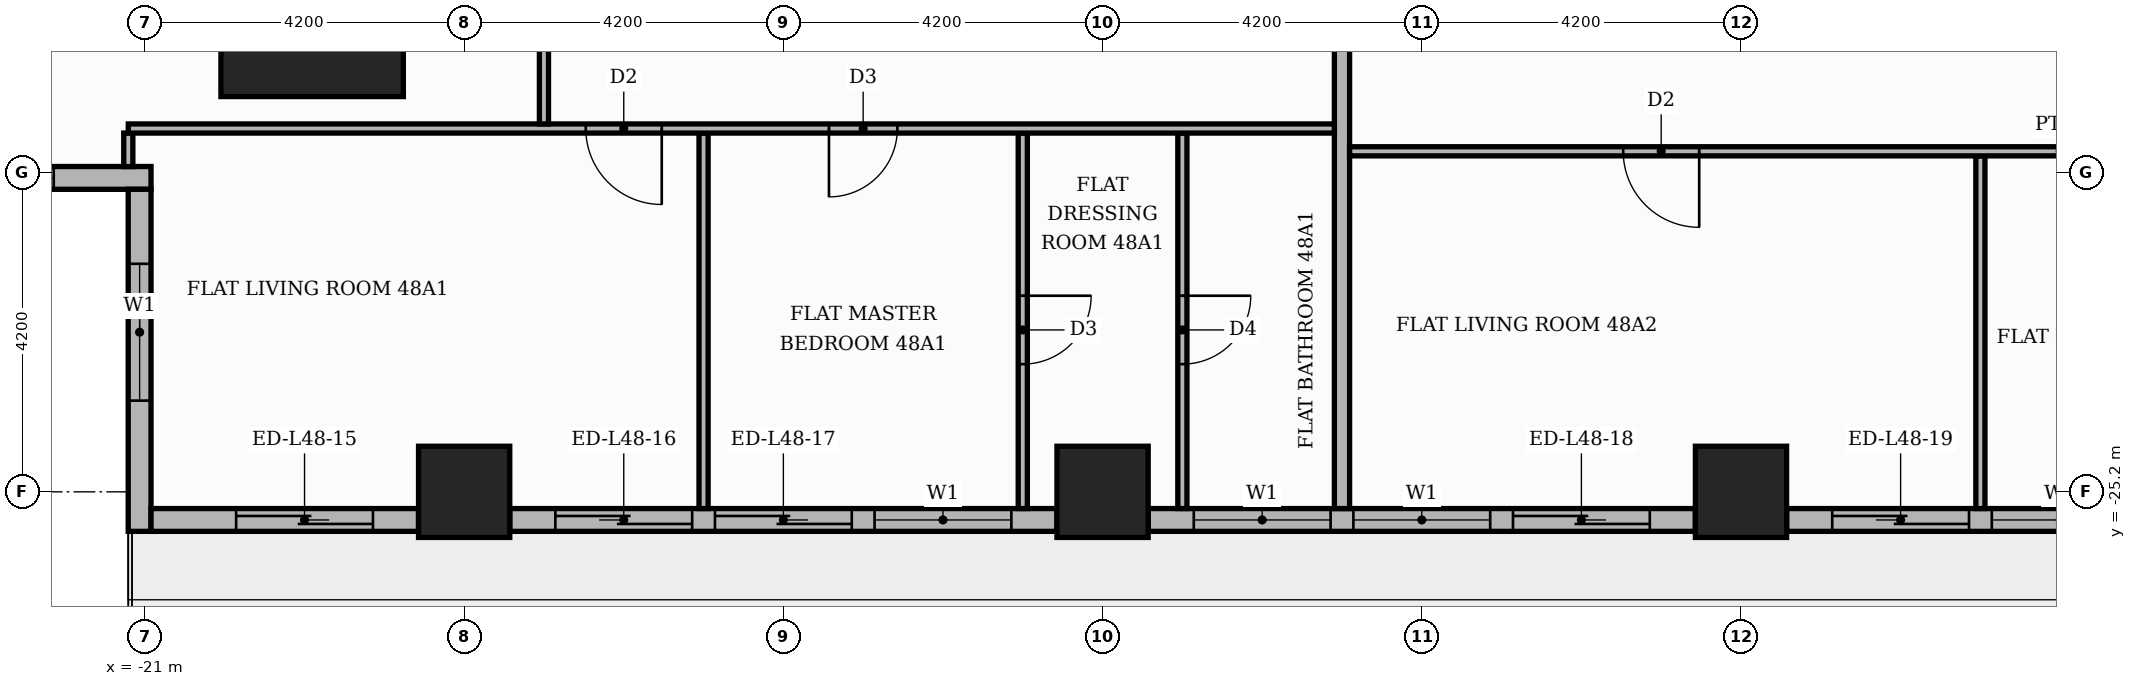
"""IFC4 building model, lengths in metres.
Left out: names, types, materials, properties, quantities, classifications, styles, units other than length and angle.
Written with IfcOpenShell. Run it as: python <this file> out.ifc"""

import sys

from ifc_helpers import new_model, si_unit, direction, frame, frame_2d, origin, origin_2d, place, context, subcontext, project, spatial, rectangle, extrude, element, fill, save


model = new_model("IFC4")
c1 = context("Model", 3, precision=1e-05, world=origin(), true_north=direction((0.0, 1.0)))
c2 = subcontext(c1, "Body", "Model", "MODEL_VIEW")
j1 = project(units=[si_unit("LENGTHUNIT", "METRE"), si_unit("PLANEANGLEUNIT", "RADIAN")], contexts=[c1])
p1 = place(None, origin())
s1 = spatial("IfcSite", under=j1, at=p1, CompositionType="ELEMENT")
p2 = place(p1, origin())
s2 = spatial("IfcBuilding", under=s1, at=p2, CompositionType="ELEMENT")
p3 = place(p2, frame((0.0, 0.0, 204.0)))
s3 = spatial("IfcBuildingStorey", under=s2, at=p3, CompositionType="ELEMENT", Elevation=204.0)
p4 = place(p3, frame((-18.8, -18.8, 0.0), z_axis=(0.0, 0.0, 1.0), x_axis=(1.0, 0.0, 0.0)))
e1 = element("IfcColumn", 1, at=p4, inside=s3, PredefinedType="COLUMN", context=c2, shape_type="SweptSolid", body=[
    extrude(rectangle(XDim=2.4, YDim=2.4, at=origin_2d()), origin(), (0.0, 0.0, 1.0), 3.9),
])
for number, where, z_axis, x_axis in (
    (2, (0.0, -25.2, 0.0), (0.0, 0.0, 1.0), (1.0, 0.0, 0.0)),
    (3, (-8.4, -25.2, 0.0), (0.0, 0.0, 1.0), (1.0, 0.0, 0.0)),
    (4, (-16.8, -25.2, 0.0), (0.0, 0.0, 1.0), (1.0, 0.0, 0.0)),
):
    element("IfcColumn", number, at=place(p3, frame(where, z_axis=z_axis, x_axis=x_axis)), inside=s3, PredefinedType="COLUMN", context=c2, shape_type="SweptSolid", body=[
        extrude(rectangle(XDim=1.2, YDim=1.2, at=origin_2d()), origin(), (0.0, 0.0, 1.0), 3.9),
    ])
p5 = place(p3, frame((-25.42, -21.07, 0.0), z_axis=(0.0, 0.0, 1.0), x_axis=(1.0, 0.0, 0.0)))
e5 = element("IfcWall", 5, at=p5, inside=s3, PredefinedType="STANDARD", context=c2, shape_type="SweptSolid", body=[
    extrude(rectangle(XDim=4.5, YDim=0.3, at=frame_2d((2.25, 0.0))), origin(), (0.0, 0.0, 1.0), 3.48),
])
p6 = place(p5, frame((1.42, 0.0, 0.9)))
e6 = element("IfcOpeningElement", 6, at=p6, cuts=e5, PredefinedType="OPENING", context=c2, shape_type="SweptSolid", body=[
    extrude(rectangle(XDim=1.8, YDim=2.1, at=frame_2d((0.9, 1.05))), frame((0.0, 0.16, 0.0), z_axis=(0.0, -1.0, 0.0), x_axis=(1.0, 0.0, 0.0)), (0.0, 0.0, 1.0), 0.32),
])
p7 = place(p3, frame((-21.07, -21.22, 0.0), z_axis=(0.0, 0.0, 1.0), x_axis=(0.0, -1.0, 0.0)))
e7 = element("IfcWall", 7, at=p7, inside=s3, PredefinedType="STANDARD", context=c2, shape_type="SweptSolid", body=[
    extrude(rectangle(XDim=4.5, YDim=0.3, at=frame_2d((2.25, 0.0))), origin(), (0.0, 0.0, 1.0), 3.48),
])
p8 = place(p7, frame((0.98, 0.0, 0.9)))
e8 = element("IfcOpeningElement", 8, at=p8, cuts=e7, PredefinedType="OPENING", context=c2, shape_type="SweptSolid", body=[
    extrude(rectangle(XDim=1.8, YDim=2.1, at=frame_2d((0.9, 1.05))), frame((0.0, 0.16, 0.0), z_axis=(0.0, -1.0, 0.0), x_axis=(1.0, 0.0, 0.0)), (0.0, 0.0, 1.0), 0.32),
])
p9 = place(p3, frame((-20.92, -25.57, 0.0), z_axis=(0.0, 0.0, 1.0), x_axis=(1.0, 0.0, 0.0)))
e9 = element("IfcWall", 9, at=p9, inside=s3, PredefinedType="STANDARD", context=c2, shape_type="SweptSolid", body=[
    extrude(rectangle(XDim=3.52, YDim=0.3, at=frame_2d((1.76, 0.0))), origin(), (0.0, 0.0, 1.0), 3.48),
])
p10 = place(p9, frame((1.12, 0.0, 0.0)))
e10 = element("IfcOpeningElement", 10, at=p10, cuts=e9, PredefinedType="OPENING", context=c2, shape_type="SweptSolid", body=[
    extrude(rectangle(XDim=1.8, YDim=2.4, at=frame_2d((0.9, 1.2))), frame((0.0, 0.16, 0.0), z_axis=(0.0, -1.0, 0.0), x_axis=(1.0, 0.0, 0.0)), (0.0, 0.0, 1.0), 0.32),
])
p11 = place(p3, frame((-16.2, -25.57, 0.0), z_axis=(0.0, 0.0, 1.0), x_axis=(1.0, 0.0, 0.0)))
e11 = element("IfcWall", 11, at=p11, inside=s3, PredefinedType="STANDARD", context=c2, shape_type="SweptSolid", body=[
    extrude(rectangle(XDim=7.2, YDim=0.3, at=frame_2d((3.6, 0.0))), origin(), (0.0, 0.0, 1.0), 3.48),
])
p12 = place(p11, frame((0.6, 0.0, 0.0)))
e12 = element("IfcOpeningElement", 12, at=p12, cuts=e11, PredefinedType="OPENING", context=c2, shape_type="SweptSolid", body=[
    extrude(rectangle(XDim=1.8, YDim=2.4, at=frame_2d((0.9, 1.2))), frame((0.0, 0.16, 0.0), z_axis=(0.0, -1.0, 0.0), x_axis=(1.0, 0.0, 0.0)), (0.0, 0.0, 1.0), 0.32),
])
p13 = place(p11, frame((2.7, 0.0, 0.0)))
e13 = element("IfcOpeningElement", 13, at=p13, cuts=e11, PredefinedType="OPENING", context=c2, shape_type="SweptSolid", body=[
    extrude(rectangle(XDim=1.8, YDim=2.4, at=frame_2d((0.9, 1.2))), frame((0.0, 0.16, 0.0), z_axis=(0.0, -1.0, 0.0), x_axis=(1.0, 0.0, 0.0)), (0.0, 0.0, 1.0), 0.32),
])
p14 = place(p11, frame((4.8, 0.0, 0.9)))
e14 = element("IfcOpeningElement", 14, at=p14, cuts=e11, PredefinedType="OPENING", context=c2, shape_type="SweptSolid", body=[
    extrude(rectangle(XDim=1.8, YDim=2.1, at=frame_2d((0.9, 1.05))), frame((0.0, 0.16, 0.0), z_axis=(0.0, -1.0, 0.0), x_axis=(1.0, 0.0, 0.0)), (0.0, 0.0, 1.0), 0.32),
])
p15 = place(p3, frame((-7.8, -25.57, 0.0), z_axis=(0.0, 0.0, 1.0), x_axis=(1.0, 0.0, 0.0)))
e15 = element("IfcWall", 15, at=p15, inside=s3, PredefinedType="STANDARD", context=c2, shape_type="SweptSolid", body=[
    extrude(rectangle(XDim=7.2, YDim=0.3, at=frame_2d((3.6, 0.0))), origin(), (0.0, 0.0, 1.0), 3.48),
])
p16 = place(p15, frame((0.6, 0.0, 0.9)))
e16 = element("IfcOpeningElement", 16, at=p16, cuts=e15, PredefinedType="OPENING", context=c2, shape_type="SweptSolid", body=[
    extrude(rectangle(XDim=1.8, YDim=2.1, at=frame_2d((0.9, 1.05))), frame((0.0, 0.16, 0.0), z_axis=(0.0, -1.0, 0.0), x_axis=(1.0, 0.0, 0.0)), (0.0, 0.0, 1.0), 0.32),
])
p17 = place(p15, frame((2.7, 0.0, 0.9)))
e17 = element("IfcOpeningElement", 17, at=p17, cuts=e15, PredefinedType="OPENING", context=c2, shape_type="SweptSolid", body=[
    extrude(rectangle(XDim=1.8, YDim=2.1, at=frame_2d((0.9, 1.05))), frame((0.0, 0.16, 0.0), z_axis=(0.0, -1.0, 0.0), x_axis=(1.0, 0.0, 0.0)), (0.0, 0.0, 1.0), 0.32),
])
p18 = place(p15, frame((4.8, 0.0, 0.0)))
e18 = element("IfcOpeningElement", 18, at=p18, cuts=e15, PredefinedType="OPENING", context=c2, shape_type="SweptSolid", body=[
    extrude(rectangle(XDim=1.8, YDim=2.4, at=frame_2d((0.9, 1.2))), frame((0.0, 0.16, 0.0), z_axis=(0.0, -1.0, 0.0), x_axis=(1.0, 0.0, 0.0)), (0.0, 0.0, 1.0), 0.32),
])
p19 = place(p3, frame((0.6, -25.57, 0.0), z_axis=(0.0, 0.0, 1.0), x_axis=(1.0, 0.0, 0.0)))
e19 = element("IfcWall", 19, at=p19, inside=s3, PredefinedType="STANDARD", context=c2, shape_type="SweptSolid", body=[
    extrude(rectangle(XDim=7.2, YDim=0.3, at=frame_2d((3.6, 0.0))), origin(), (0.0, 0.0, 1.0), 3.48),
])
p20 = place(p19, frame((0.6, 0.0, 0.0)))
e20 = element("IfcOpeningElement", 20, at=p20, cuts=e19, PredefinedType="OPENING", context=c2, shape_type="SweptSolid", body=[
    extrude(rectangle(XDim=1.8, YDim=2.4, at=frame_2d((0.9, 1.2))), frame((0.0, 0.16, 0.0), z_axis=(0.0, -1.0, 0.0), x_axis=(1.0, 0.0, 0.0)), (0.0, 0.0, 1.0), 0.32),
])
p21 = place(p19, frame((2.7, 0.0, 0.9)))
e21 = element("IfcOpeningElement", 21, at=p21, cuts=e19, PredefinedType="OPENING", context=c2, shape_type="SweptSolid", body=[
    extrude(rectangle(XDim=1.8, YDim=2.1, at=frame_2d((0.9, 1.05))), frame((0.0, 0.16, 0.0), z_axis=(0.0, -1.0, 0.0), x_axis=(1.0, 0.0, 0.0)), (0.0, 0.0, 1.0), 0.32),
])
p22 = place(p19, frame((4.8, 0.0, 0.0)))
e22 = element("IfcOpeningElement", 22, at=p22, cuts=e19, PredefinedType="OPENING", context=c2, shape_type="SweptSolid", body=[
    extrude(rectangle(XDim=1.8, YDim=2.4, at=frame_2d((0.9, 1.2))), frame((0.0, 0.16, 0.0), z_axis=(0.0, -1.0, 0.0), x_axis=(1.0, 0.0, 0.0)), (0.0, 0.0, 1.0), 0.32),
])
p23 = place(p3, frame((-13.65, -25.42, 0.0), z_axis=(0.0, 0.0, 1.0), x_axis=(0.0, 1.0, 0.0)))
e23 = element("IfcWall", 23, at=p23, inside=s3, PredefinedType="PARTITIONING", context=c2, shape_type="SweptSolid", body=[
    extrude(rectangle(XDim=4.94, YDim=0.12, at=frame_2d((2.47, 0.0))), origin(), (0.0, 0.0, 1.0), 3.48),
])
p24 = place(p3, frame((-9.45, -25.42, 0.0), z_axis=(0.0, 0.0, 1.0), x_axis=(0.0, 1.0, 0.0)))
e24 = element("IfcWall", 24, at=p24, inside=s3, PredefinedType="PARTITIONING", context=c2, shape_type="SweptSolid", body=[
    extrude(rectangle(XDim=4.94, YDim=0.12, at=frame_2d((2.47, 0.0))), origin(), (0.0, 0.0, 1.0), 3.48),
])
p25 = place(p24, frame((1.9, 0.0, 0.0)))
e25 = element("IfcOpeningElement", 25, at=p25, cuts=e24, PredefinedType="OPENING", context=c2, shape_type="SweptSolid", body=[
    extrude(rectangle(XDim=0.9, YDim=2.1, at=frame_2d((0.45, 1.05))), frame((0.0, 0.07, 0.0), z_axis=(0.0, -1.0, 0.0), x_axis=(1.0, 0.0, 0.0)), (0.0, 0.0, 1.0), 0.14),
])
p26 = place(p3, frame((-7.35, -25.42, 0.0), z_axis=(0.0, 0.0, 1.0), x_axis=(0.0, 1.0, 0.0)))
e26 = element("IfcWall", 26, at=p26, inside=s3, PredefinedType="PARTITIONING", context=c2, shape_type="SweptSolid", body=[
    extrude(rectangle(XDim=4.94, YDim=0.12, at=frame_2d((2.47, 0.0))), origin(), (0.0, 0.0, 1.0), 3.48),
])
p27 = place(p26, frame((1.9, 0.0, 0.0)))
e27 = element("IfcOpeningElement", 27, at=p27, cuts=e26, PredefinedType="OPENING", context=c2, shape_type="SweptSolid", body=[
    extrude(rectangle(XDim=0.9, YDim=2.1, at=frame_2d((0.45, 1.05))), frame((0.0, 0.07, 0.0), z_axis=(0.0, -1.0, 0.0), x_axis=(1.0, 0.0, 0.0)), (0.0, 0.0, 1.0), 0.14),
])
p28 = place(p3, frame((-5.25, -25.42, 0.0), z_axis=(0.0, 0.0, 1.0), x_axis=(0.0, 1.0, 0.0)))
e28 = element("IfcWall", 28, at=p28, inside=s3, PredefinedType="PARTITIONING", context=c2, shape_type="SweptSolid", body=[
    extrude(rectangle(XDim=11.67, YDim=0.2, at=frame_2d((5.835, 0.0))), origin(), (0.0, 0.0, 1.0), 3.48),
])
p29 = place(p3, frame((3.15, -25.42, 0.0), z_axis=(0.0, 0.0, 1.0), x_axis=(0.0, 1.0, 0.0)))
e29 = element("IfcWall", 29, at=p29, inside=s3, PredefinedType="PARTITIONING", context=c2, shape_type="SweptSolid", body=[
    extrude(rectangle(XDim=4.64, YDim=0.12, at=frame_2d((2.32, 0.0))), origin(), (0.0, 0.0, 1.0), 3.48),
])
p30 = place(p3, frame((-21.219, -20.921, 0.0), z_axis=(0.0, 0.0, 1.0), x_axis=(0.0, 1.0, 0.0)))
e30 = element("IfcWall", 30, at=p30, inside=s3, PredefinedType="PARTITIONING", context=c2, shape_type="SweptSolid", body=[
    extrude(rectangle(XDim=0.441, YDim=0.12, at=frame_2d((0.22, 0.0))), origin(), (0.0, 0.0, 1.0), 3.48),
])
p31 = place(p3, frame((-5.15, -20.72, 0.0), z_axis=(0.0, 0.0, 1.0), x_axis=(1.0, 0.0, 0.0)))
e31 = element("IfcWall", 31, at=p31, inside=s3, PredefinedType="PARTITIONING", context=c2, shape_type="SweptSolid", body=[
    extrude(rectangle(XDim=18.7, YDim=0.12, at=frame_2d((9.35, 0.0))), origin(), (0.0, 0.0, 1.0), 3.48),
])
p32 = place(p31, frame((3.6, 0.0, 0.0)))
e32 = element("IfcOpeningElement", 32, at=p32, cuts=e31, PredefinedType="OPENING", context=c2, shape_type="SweptSolid", body=[
    extrude(rectangle(XDim=1.0, YDim=2.1, at=frame_2d((0.5, 1.05))), frame((0.0, 0.07, 0.0), z_axis=(0.0, -1.0, 0.0), x_axis=(1.0, 0.0, 0.0)), (0.0, 0.0, 1.0), 0.14),
])
p33 = place(p31, frame((11.0, 0.0, 0.0)))
e33 = element("IfcOpeningElement", 33, at=p33, cuts=e31, PredefinedType="OPENING", context=c2, shape_type="SweptSolid", body=[
    extrude(rectangle(XDim=0.9, YDim=2.1, at=frame_2d((0.45, 1.05))), frame((0.0, 0.07, 0.0), z_axis=(0.0, -1.0, 0.0), x_axis=(1.0, 0.0, 0.0)), (0.0, 0.0, 1.0), 0.14),
])
p34 = place(p3, frame((-21.219, -20.42, 0.0), z_axis=(0.0, 0.0, 1.0), x_axis=(1.0, 0.0, 0.0)))
e34 = element("IfcWall", 34, at=p34, inside=s3, PredefinedType="PARTITIONING", context=c2, shape_type="SweptSolid", body=[
    extrude(rectangle(XDim=15.869, YDim=0.12, at=frame_2d((7.935, 0.0))), origin(), (0.0, 0.0, 1.0), 3.48),
])
p35 = place(p34, frame((6.019, 0.0, 0.0)))
e35 = element("IfcOpeningElement", 35, at=p35, cuts=e34, PredefinedType="OPENING", context=c2, shape_type="SweptSolid", body=[
    extrude(rectangle(XDim=1.0, YDim=2.1, at=frame_2d((0.5, 1.05))), frame((0.0, 0.07, 0.0), z_axis=(0.0, -1.0, 0.0), x_axis=(1.0, 0.0, 0.0)), (0.0, 0.0, 1.0), 0.14),
])
p36 = place(p34, frame((9.219, 0.0, 0.0)))
e36 = element("IfcOpeningElement", 36, at=p36, cuts=e34, PredefinedType="OPENING", context=c2, shape_type="SweptSolid", body=[
    extrude(rectangle(XDim=0.9, YDim=2.1, at=frame_2d((0.45, 1.05))), frame((0.0, 0.07, 0.0), z_axis=(0.0, -1.0, 0.0), x_axis=(1.0, 0.0, 0.0)), (0.0, 0.0, 1.0), 0.14),
])
p37 = place(p3, frame((-15.75, -20.36, 0.0), z_axis=(0.0, 0.0, 1.0), x_axis=(0.0, 1.0, 0.0)))
e37 = element("IfcWall", 37, at=p37, inside=s3, PredefinedType="PARTITIONING", context=c2, shape_type="SweptSolid", body=[
    extrude(rectangle(XDim=6.61, YDim=0.12, at=frame_2d((3.305, 0.0))), origin(), (0.0, 0.0, 1.0), 3.48),
])
p38 = place(p37, frame((2.825, 0.0, 0.0)))
e38 = element("IfcOpeningElement", 38, at=p38, cuts=e37, PredefinedType="OPENING", context=c2, shape_type="SweptSolid", body=[
    extrude(rectangle(XDim=1.0, YDim=2.1, at=frame_2d((0.5, 1.05))), frame((0.0, 0.07, 0.0), z_axis=(0.0, -1.0, 0.0), x_axis=(1.0, 0.0, 0.0)), (0.0, 0.0, 1.0), 0.14),
])
p39 = place(p6, origin())
e39 = element("IfcWindow", 39, at=p39, inside=s3, PartitioningType="SINGLE_PANEL", PredefinedType="WINDOW", context=c2, shape_type="SweptSolid", body=[
    extrude(rectangle(XDim=1.8, YDim=2.1, at=frame_2d((0.9, 1.05))), frame((0.0, 0.03, 0.0), z_axis=(0.0, -1.0, 0.0), x_axis=(1.0, 0.0, 0.0)), (0.0, 0.0, 1.0), 0.06),
])
fill(e6, e39)
p40 = place(p8, origin())
e40 = element("IfcWindow", 40, at=p40, inside=s3, PartitioningType="SINGLE_PANEL", PredefinedType="WINDOW", context=c2, shape_type="SweptSolid", body=[
    extrude(rectangle(XDim=1.8, YDim=2.1, at=frame_2d((0.9, 1.05))), frame((0.0, 0.03, 0.0), z_axis=(0.0, -1.0, 0.0), x_axis=(1.0, 0.0, 0.0)), (0.0, 0.0, 1.0), 0.06),
])
fill(e8, e40)
p41 = place(p10, origin())
e41 = element("IfcDoor", 41, at=p41, inside=s3, OperationType="SLIDING_TO_RIGHT", PredefinedType="DOOR", context=c2, shape_type="SweptSolid", body=[
    extrude(rectangle(XDim=1.8, YDim=2.4, at=frame_2d((0.9, 1.2))), frame((0.0, 0.025, 0.0), z_axis=(0.0, -1.0, 0.0), x_axis=(1.0, 0.0, 0.0)), (0.0, 0.0, 1.0), 0.05),
])
fill(e10, e41)
p42 = place(p12, origin())
e42 = element("IfcDoor", 42, at=p42, inside=s3, OperationType="SLIDING_TO_LEFT", PredefinedType="DOOR", context=c2, shape_type="SweptSolid", body=[
    extrude(rectangle(XDim=1.8, YDim=2.4, at=frame_2d((0.9, 1.2))), frame((0.0, 0.025, 0.0), z_axis=(0.0, -1.0, 0.0), x_axis=(1.0, 0.0, 0.0)), (0.0, 0.0, 1.0), 0.05),
])
fill(e12, e42)
p43 = place(p13, origin())
e43 = element("IfcDoor", 43, at=p43, inside=s3, OperationType="SLIDING_TO_RIGHT", PredefinedType="DOOR", context=c2, shape_type="SweptSolid", body=[
    extrude(rectangle(XDim=1.8, YDim=2.4, at=frame_2d((0.9, 1.2))), frame((0.0, 0.025, 0.0), z_axis=(0.0, -1.0, 0.0), x_axis=(1.0, 0.0, 0.0)), (0.0, 0.0, 1.0), 0.05),
])
fill(e13, e43)
p44 = place(p14, origin())
e44 = element("IfcWindow", 44, at=p44, inside=s3, PartitioningType="SINGLE_PANEL", PredefinedType="WINDOW", context=c2, shape_type="SweptSolid", body=[
    extrude(rectangle(XDim=1.8, YDim=2.1, at=frame_2d((0.9, 1.05))), frame((0.0, 0.03, 0.0), z_axis=(0.0, -1.0, 0.0), x_axis=(1.0, 0.0, 0.0)), (0.0, 0.0, 1.0), 0.06),
])
fill(e14, e44)
p45 = place(p16, origin())
e45 = element("IfcWindow", 45, at=p45, inside=s3, PartitioningType="SINGLE_PANEL", PredefinedType="WINDOW", context=c2, shape_type="SweptSolid", body=[
    extrude(rectangle(XDim=1.8, YDim=2.1, at=frame_2d((0.9, 1.05))), frame((0.0, 0.03, 0.0), z_axis=(0.0, -1.0, 0.0), x_axis=(1.0, 0.0, 0.0)), (0.0, 0.0, 1.0), 0.06),
])
fill(e16, e45)
p46 = place(p17, origin())
e46 = element("IfcWindow", 46, at=p46, inside=s3, PartitioningType="SINGLE_PANEL", PredefinedType="WINDOW", context=c2, shape_type="SweptSolid", body=[
    extrude(rectangle(XDim=1.8, YDim=2.1, at=frame_2d((0.9, 1.05))), frame((0.0, 0.03, 0.0), z_axis=(0.0, -1.0, 0.0), x_axis=(1.0, 0.0, 0.0)), (0.0, 0.0, 1.0), 0.06),
])
fill(e17, e46)
p47 = place(p18, origin())
e47 = element("IfcDoor", 47, at=p47, inside=s3, OperationType="SLIDING_TO_RIGHT", PredefinedType="DOOR", context=c2, shape_type="SweptSolid", body=[
    extrude(rectangle(XDim=1.8, YDim=2.4, at=frame_2d((0.9, 1.2))), frame((0.0, 0.025, 0.0), z_axis=(0.0, -1.0, 0.0), x_axis=(1.0, 0.0, 0.0)), (0.0, 0.0, 1.0), 0.05),
])
fill(e18, e47)
p48 = place(p20, origin())
e48 = element("IfcDoor", 48, at=p48, inside=s3, OperationType="SLIDING_TO_LEFT", PredefinedType="DOOR", context=c2, shape_type="SweptSolid", body=[
    extrude(rectangle(XDim=1.8, YDim=2.4, at=frame_2d((0.9, 1.2))), frame((0.0, 0.025, 0.0), z_axis=(0.0, -1.0, 0.0), x_axis=(1.0, 0.0, 0.0)), (0.0, 0.0, 1.0), 0.05),
])
fill(e20, e48)
p49 = place(p21, origin())
e49 = element("IfcWindow", 49, at=p49, inside=s3, PartitioningType="SINGLE_PANEL", PredefinedType="WINDOW", context=c2, shape_type="SweptSolid", body=[
    extrude(rectangle(XDim=1.8, YDim=2.1, at=frame_2d((0.9, 1.05))), frame((0.0, 0.03, 0.0), z_axis=(0.0, -1.0, 0.0), x_axis=(1.0, 0.0, 0.0)), (0.0, 0.0, 1.0), 0.06),
])
fill(e21, e49)
p50 = place(p35, frame((1.0, 0.0, 0.0), z_axis=(0.0, 0.0, 1.0), x_axis=(-1.0, 0.0, 0.0)))
e50 = element("IfcDoor", 50, at=p50, inside=s3, OperationType="SINGLE_SWING_RIGHT", PredefinedType="DOOR", context=c2, shape_type="SweptSolid", body=[
    extrude(rectangle(XDim=1.0, YDim=2.1, at=frame_2d((0.5, 1.05))), frame((0.0, 0.025, 0.0), z_axis=(0.0, -1.0, 0.0), x_axis=(1.0, 0.0, 0.0)), (0.0, 0.0, 1.0), 0.05),
])
fill(e35, e50)
p51 = place(p36, frame((0.9, 0.0, 0.0), z_axis=(0.0, 0.0, 1.0), x_axis=(-1.0, 0.0, 0.0)))
e51 = element("IfcDoor", 51, at=p51, inside=s3, OperationType="SINGLE_SWING_LEFT", PredefinedType="DOOR", context=c2, shape_type="SweptSolid", body=[
    extrude(rectangle(XDim=0.9, YDim=2.1, at=frame_2d((0.45, 1.05))), frame((0.0, 0.025, 0.0), z_axis=(0.0, -1.0, 0.0), x_axis=(1.0, 0.0, 0.0)), (0.0, 0.0, 1.0), 0.05),
])
fill(e36, e51)
p52 = place(p25, frame((0.9, 0.0, 0.0), z_axis=(0.0, 0.0, 1.0), x_axis=(-1.0, 0.0, 0.0)))
e52 = element("IfcDoor", 52, at=p52, inside=s3, OperationType="SINGLE_SWING_RIGHT", PredefinedType="DOOR", context=c2, shape_type="SweptSolid", body=[
    extrude(rectangle(XDim=0.9, YDim=2.1, at=frame_2d((0.45, 1.05))), frame((0.0, 0.025, 0.0), z_axis=(0.0, -1.0, 0.0), x_axis=(1.0, 0.0, 0.0)), (0.0, 0.0, 1.0), 0.05),
])
fill(e25, e52)
p53 = place(p27, frame((0.9, 0.0, 0.0), z_axis=(0.0, 0.0, 1.0), x_axis=(-1.0, 0.0, 0.0)))
e53 = element("IfcDoor", 53, at=p53, inside=s3, OperationType="SINGLE_SWING_RIGHT", PredefinedType="DOOR", context=c2, shape_type="SweptSolid", body=[
    extrude(rectangle(XDim=0.9, YDim=2.1, at=frame_2d((0.45, 1.05))), frame((0.0, 0.025, 0.0), z_axis=(0.0, -1.0, 0.0), x_axis=(1.0, 0.0, 0.0)), (0.0, 0.0, 1.0), 0.05),
])
fill(e27, e53)
p54 = place(p32, frame((1.0, 0.0, 0.0), z_axis=(0.0, 0.0, 1.0), x_axis=(-1.0, 0.0, 0.0)))
e54 = element("IfcDoor", 54, at=p54, inside=s3, OperationType="SINGLE_SWING_RIGHT", PredefinedType="DOOR", context=c2, shape_type="SweptSolid", body=[
    extrude(rectangle(XDim=1.0, YDim=2.1, at=frame_2d((0.5, 1.05))), frame((0.0, 0.025, 0.0), z_axis=(0.0, -1.0, 0.0), x_axis=(1.0, 0.0, 0.0)), (0.0, 0.0, 1.0), 0.05),
])
fill(e32, e54)
save(model, sys.argv[1])
